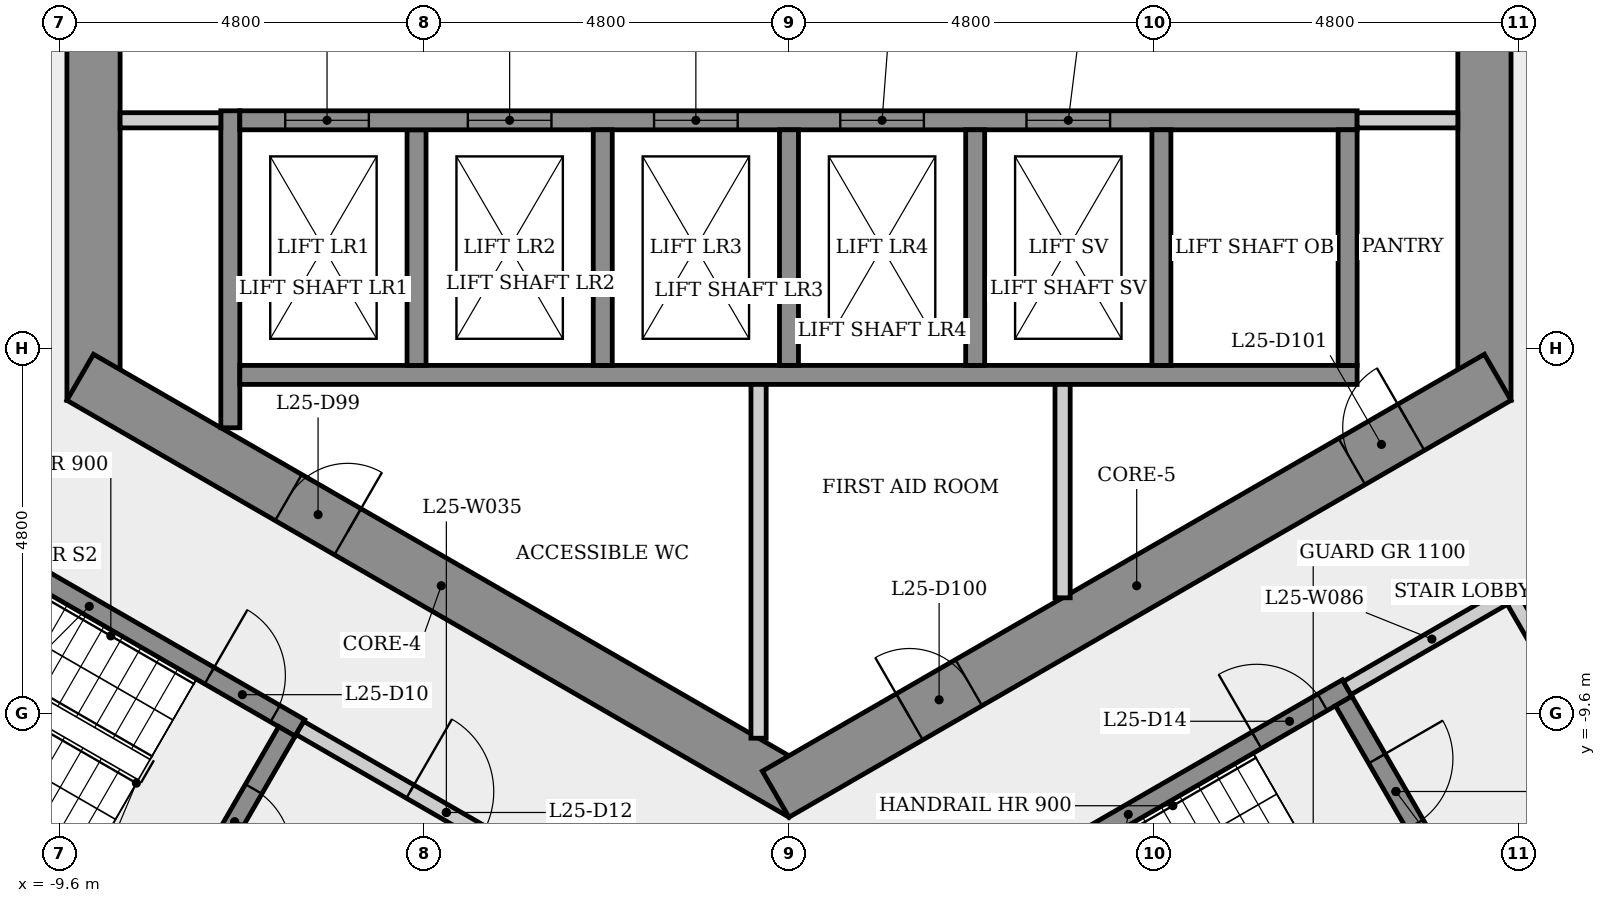
"""IFC4 building model, lengths in metres.
Left out: names, types, materials, properties, quantities, classifications, styles, units other than length and angle.
Written with IfcOpenShell. Run it as: python <this file> out.ifc"""

import sys

from ifc_helpers import new_model, si_unit, direction, frame, frame_2d, origin, place, context, subcontext, project, spatial, rectangle, extrude, element, fill, save


model = new_model("IFC4")
c1 = context("Model", 3, precision=1e-05, world=origin(), true_north=direction((0.0, 1.0)))
c2 = subcontext(c1, "Body", "Model", "MODEL_VIEW")
j1 = project(units=[si_unit("LENGTHUNIT", "METRE"), si_unit("PLANEANGLEUNIT", "RADIAN")], contexts=[c1])
p1 = place(None, origin())
s1 = spatial("IfcSite", under=j1, at=p1, CompositionType="ELEMENT")
p2 = place(p1, origin())
s2 = spatial("IfcBuilding", under=s1, at=p2, CompositionType="ELEMENT")
p3 = place(p2, frame((0.0, 0.0, 96.7)))
s3 = spatial("IfcBuildingStorey", under=s2, at=p3, CompositionType="ELEMENT", Elevation=96.7)
p4 = place(p3, frame((9.15, -5.485, 0.0), z_axis=(0.0, 0.0, 1.0), x_axis=(0.0, 1.0, 0.0)))
e1 = element("IfcWall", 1, at=p4, inside=s3, PredefinedType="SHEAR", context=c2, shape_type="SweptSolid", body=[
    extrude(rectangle(XDim=10.97, YDim=0.7, at=frame_2d((5.485, 0.0))), origin(), (0.0, 0.0, 1.0), 3.4),
])
p5 = place(p4, frame((4.685, 0.0, 0.0)))
e2 = element("IfcOpeningElement", 2, at=p5, cuts=e1, PredefinedType="OPENING", context=c2, shape_type="SweptSolid", body=[
    extrude(rectangle(XDim=1.6, YDim=2.1, at=frame_2d((0.8, 1.05))), frame((0.0, 0.36, 0.0), z_axis=(0.0, -1.0, 0.0), x_axis=(1.0, 0.0, 0.0)), (0.0, 0.0, 1.0), 0.72),
])
p6 = place(p3, frame((-9.15, 5.485, 0.0), z_axis=(0.0, 0.0, 1.0), x_axis=(0.0, -1.0, 0.0)))
e3 = element("IfcWall", 3, at=p6, inside=s3, PredefinedType="SHEAR", context=c2, shape_type="SweptSolid", body=[
    extrude(rectangle(XDim=10.97, YDim=0.7, at=frame_2d((5.485, 0.0))), origin(), (0.0, 0.0, 1.0), 3.4),
])
p7 = place(p6, frame((4.685, 0.0, 0.0)))
e4 = element("IfcOpeningElement", 4, at=p7, cuts=e3, PredefinedType="OPENING", context=c2, shape_type="SweptSolid", body=[
    extrude(rectangle(XDim=1.6, YDim=2.1, at=frame_2d((0.8, 1.05))), frame((0.0, 0.36, 0.0), z_axis=(0.0, -1.0, 0.0), x_axis=(1.0, 0.0, 0.0)), (0.0, 0.0, 1.0), 0.72),
])
p8 = place(p3, frame((-9.325, -5.182, 0.0), z_axis=(0.0, 0.0, 1.0), x_axis=(0.866023993627, -0.500002442456, 0.0)))
e5 = element("IfcWall", 5, at=p8, inside=s3, PredefinedType="SHEAR", context=c2, shape_type="SweptSolid", body=[
    extrude(rectangle(XDim=10.97, YDim=0.7, at=frame_2d((5.485, 0.0))), origin(), (0.0, 0.0, 1.0), 3.4),
])
p9 = place(p8, frame((3.164, 0.0, 0.0)))
e6 = element("IfcOpeningElement", 6, at=p9, cuts=e5, PredefinedType="OPENING", context=c2, shape_type="SweptSolid", body=[
    extrude(rectangle(XDim=0.9, YDim=2.1, at=frame_2d((0.45, 1.05))), frame((0.0, 0.36, 0.0), z_axis=(0.0, -1.0, 0.0), x_axis=(1.0, 0.0, 0.0)), (0.0, 0.0, 1.0), 0.72),
])
p10 = place(p3, frame((-0.175, -10.667, 0.0), z_axis=(0.0, 0.0, 1.0), x_axis=(0.866023993627, 0.500002442456, 0.0)))
e7 = element("IfcWall", 7, at=p10, inside=s3, PredefinedType="SHEAR", context=c2, shape_type="SweptSolid", body=[
    extrude(rectangle(XDim=10.97, YDim=0.7, at=frame_2d((5.485, 0.0))), origin(), (0.0, 0.0, 1.0), 3.4),
])
p11 = place(p10, frame((2.033, 0.0, 0.0)))
e8 = element("IfcOpeningElement", 8, at=p11, cuts=e7, PredefinedType="OPENING", context=c2, shape_type="SweptSolid", body=[
    extrude(rectangle(XDim=0.9, YDim=2.1, at=frame_2d((0.45, 1.05))), frame((0.0, 0.36, 0.0), z_axis=(0.0, -1.0, 0.0), x_axis=(1.0, 0.0, 0.0)), (0.0, 0.0, 1.0), 0.72),
])
p12 = place(p10, frame((8.754, 0.0, 0.0)))
e9 = element("IfcOpeningElement", 9, at=p12, cuts=e7, PredefinedType="OPENING", context=c2, shape_type="SweptSolid", body=[
    extrude(rectangle(XDim=0.9, YDim=2.1, at=frame_2d((0.45, 1.05))), frame((0.0, 0.36, 0.0), z_axis=(0.0, -1.0, 0.0), x_axis=(1.0, 0.0, 0.0)), (0.0, 0.0, 1.0), 0.72),
])
p13 = place(p3, frame((-11.977, -6.595, 0.0), z_axis=(0.0, 0.0, 1.0), x_axis=(0.866025499775, -0.499999833739, 0.0)))
e10 = element("IfcWall", 10, at=p13, inside=s3, PredefinedType="SHEAR", context=c2, shape_type="SweptSolid", body=[
    extrude(rectangle(XDim=6.4, YDim=0.25, at=frame_2d((3.2, 0.0))), origin(), (0.0, 0.0, 1.0), 3.05),
])
p14 = place(p13, frame((5.025, 0.0, 0.0)))
e11 = element("IfcOpeningElement", 11, at=p14, cuts=e10, PredefinedType="OPENING", context=c2, shape_type="SweptSolid", body=[
    extrude(rectangle(XDim=1.0, YDim=2.1, at=frame_2d((0.5, 1.05))), frame((0.0, 0.135, 0.0), z_axis=(0.0, -1.0, 0.0), x_axis=(1.0, 0.0, 0.0)), (0.0, 0.0, 1.0), 0.27),
])
p15 = place(p3, frame((-7.935, -12.393, 0.0), z_axis=(0.0, 0.0, 1.0), x_axis=(-0.866025499775, 0.499999833739, 0.0)))
e12 = element("IfcWall", 12, at=p15, inside=s3, PredefinedType="SHEAR", context=c2, shape_type="SweptSolid", body=[
    extrude(rectangle(XDim=6.4, YDim=0.25, at=frame_2d((3.2, 0.0))), origin(), (0.0, 0.0, 1.0), 3.05),
])
p16 = place(p3, frame((-7.35, -5.846, 0.0), z_axis=(0.0, 0.0, 1.0), x_axis=(0.0, 1.0, 0.0)))
e13 = element("IfcWall", 13, at=p16, inside=s3, PredefinedType="SHEAR", context=c2, shape_type="SweptSolid", body=[
    extrude(rectangle(XDim=4.171, YDim=0.25, at=frame_2d((2.085, 0.0))), origin(), (0.0, 0.0, 1.0), 3.05),
])
p17 = place(p3, frame((-7.475, -1.8, 0.0), z_axis=(0.0, 0.0, 1.0), x_axis=(-1.0, 0.0, 0.0)))
e14 = element("IfcWall", 14, at=p17, inside=s3, PredefinedType="PARTITIONING", context=c2, shape_type="SweptSolid", body=[
    extrude(rectangle(XDim=1.325, YDim=0.2, at=frame_2d((0.663, 0.0))), origin(), (0.0, 0.0, 1.0), 3.05),
])
p18 = place(p3, frame((-6.605, -9.841, 0.0), z_axis=(0.0, 0.0, 1.0), x_axis=(-0.499996545922, -0.866027397988, 0.0)))
e15 = element("IfcWall", 15, at=p18, inside=s3, PredefinedType="SHEAR", context=c2, shape_type="SweptSolid", body=[
    extrude(rectangle(XDim=2.75, YDim=0.25, at=frame_2d((1.375, 0.0))), origin(), (0.0, 0.0, 1.0), 3.05),
])
p19 = place(p18, frame((0.875, 0.0, 0.0)))
e16 = element("IfcOpeningElement", 16, at=p19, cuts=e15, PredefinedType="OPENING", context=c2, shape_type="SweptSolid", body=[
    extrude(rectangle(XDim=1.0, YDim=2.1, at=frame_2d((0.5, 1.05))), frame((0.0, 0.135, 0.0), z_axis=(0.0, -1.0, 0.0), x_axis=(1.0, 0.0, 0.0)), (0.0, 0.0, 1.0), 0.27),
])
p20 = place(p3, frame((-6.435, -9.795, 0.0), z_axis=(0.0, 0.0, 1.0), x_axis=(0.866012907634, -0.500021643343, 0.0)))
e17 = element("IfcWall", 17, at=p20, inside=s3, PredefinedType="PARTITIONING", context=c2, shape_type="SweptSolid", body=[
    extrude(rectangle(XDim=4.45, YDim=0.2, at=frame_2d((2.225, 0.0))), origin(), (0.0, 0.0, 1.0), 3.05),
])
p21 = place(p20, frame((1.675, 0.0, 0.0)))
e18 = element("IfcOpeningElement", 18, at=p21, cuts=e17, PredefinedType="OPENING", context=c2, shape_type="SweptSolid", body=[
    extrude(rectangle(XDim=1.1, YDim=2.1, at=frame_2d((0.55, 1.05))), frame((0.0, 0.11, 0.0), z_axis=(0.0, -1.0, 0.0), x_axis=(1.0, 0.0, 0.0)), (0.0, 0.0, 1.0), 0.22),
])
p22 = place(p3, frame((-7.225, -5.15, 0.0), z_axis=(0.0, 0.0, 1.0), x_axis=(1.0, 0.0, 0.0)))
e19 = element("IfcWall", 19, at=p22, inside=s3, PredefinedType="SHEAR", context=c2, shape_type="SweptSolid", body=[
    extrude(rectangle(XDim=14.7, YDim=0.25, at=frame_2d((7.35, 0.0))), origin(), (0.0, 0.0, 1.0), 3.05),
])
p23 = place(p3, frame((-4.9, -1.925, 0.0), z_axis=(0.0, 0.0, 1.0), x_axis=(0.0, -1.0, 0.0)))
e20 = element("IfcWall", 20, at=p23, inside=s3, PredefinedType="SHEAR", context=c2, shape_type="SweptSolid", body=[
    extrude(rectangle(XDim=3.1, YDim=0.25, at=frame_2d((1.55, 0.0))), origin(), (0.0, 0.0, 1.0), 3.4),
])
p24 = place(p3, frame((-7.225, -1.8, 0.0), z_axis=(0.0, 0.0, 1.0), x_axis=(1.0, 0.0, 0.0)))
e21 = element("IfcWall", 21, at=p24, inside=s3, PredefinedType="SHEAR", context=c2, shape_type="SweptSolid", body=[
    extrude(rectangle(XDim=14.7, YDim=0.25, at=frame_2d((7.35, 0.0))), origin(), (0.0, 0.0, 1.0), 3.05),
])
p25 = place(p24, frame((0.597, 0.0, 0.0)))
e22 = element("IfcOpeningElement", 22, at=p25, cuts=e21, PredefinedType="OPENING", context=c2, shape_type="SweptSolid", body=[
    extrude(rectangle(XDim=1.1, YDim=2.1, at=frame_2d((0.55, 1.05))), frame((0.0, 0.135, 0.0), z_axis=(0.0, -1.0, 0.0), x_axis=(1.0, 0.0, 0.0)), (0.0, 0.0, 1.0), 0.27),
])
p26 = place(p24, frame((3.0, 0.0, 0.0)))
e23 = element("IfcOpeningElement", 23, at=p26, cuts=e21, PredefinedType="OPENING", context=c2, shape_type="SweptSolid", body=[
    extrude(rectangle(XDim=1.1, YDim=2.1, at=frame_2d((0.55, 1.05))), frame((0.0, 0.135, 0.0), z_axis=(0.0, -1.0, 0.0), x_axis=(1.0, 0.0, 0.0)), (0.0, 0.0, 1.0), 0.27),
])
p27 = place(p24, frame((5.45, 0.0, 0.0)))
e24 = element("IfcOpeningElement", 24, at=p27, cuts=e21, PredefinedType="OPENING", context=c2, shape_type="SweptSolid", body=[
    extrude(rectangle(XDim=1.1, YDim=2.1, at=frame_2d((0.55, 1.05))), frame((0.0, 0.135, 0.0), z_axis=(0.0, -1.0, 0.0), x_axis=(1.0, 0.0, 0.0)), (0.0, 0.0, 1.0), 0.27),
])
p28 = place(p24, frame((7.9, 0.0, 0.0)))
e25 = element("IfcOpeningElement", 25, at=p28, cuts=e21, PredefinedType="OPENING", context=c2, shape_type="SweptSolid", body=[
    extrude(rectangle(XDim=1.1, YDim=2.1, at=frame_2d((0.55, 1.05))), frame((0.0, 0.135, 0.0), z_axis=(0.0, -1.0, 0.0), x_axis=(1.0, 0.0, 0.0)), (0.0, 0.0, 1.0), 0.27),
])
p29 = place(p24, frame((10.35, 0.0, 0.0)))
e26 = element("IfcOpeningElement", 26, at=p29, cuts=e21, PredefinedType="OPENING", context=c2, shape_type="SweptSolid", body=[
    extrude(rectangle(XDim=1.1, YDim=2.1, at=frame_2d((0.55, 1.05))), frame((0.0, 0.135, 0.0), z_axis=(0.0, -1.0, 0.0), x_axis=(1.0, 0.0, 0.0)), (0.0, 0.0, 1.0), 0.27),
])
p30 = place(p3, frame((-2.45, -1.925, 0.0), z_axis=(0.0, 0.0, 1.0), x_axis=(0.0, -1.0, 0.0)))
e27 = element("IfcWall", 27, at=p30, inside=s3, PredefinedType="SHEAR", context=c2, shape_type="SweptSolid", body=[
    extrude(rectangle(XDim=3.1, YDim=0.25, at=frame_2d((1.55, 0.0))), origin(), (0.0, 0.0, 1.0), 3.4),
])
p31 = place(p3, frame((-0.4, -5.275, 0.0), z_axis=(0.0, 0.0, 1.0), x_axis=(0.0, -1.0, 0.0)))
e28 = element("IfcWall", 28, at=p31, inside=s3, PredefinedType="PARTITIONING", context=c2, shape_type="SweptSolid", body=[
    extrude(rectangle(XDim=4.656, YDim=0.2, at=frame_2d((2.328, 0.0))), origin(), (0.0, 0.0, 1.0), 3.05),
])
p32 = place(p3, frame((0.0, -1.925, 0.0), z_axis=(0.0, 0.0, 1.0), x_axis=(0.0, -1.0, 0.0)))
e29 = element("IfcWall", 29, at=p32, inside=s3, PredefinedType="SHEAR", context=c2, shape_type="SweptSolid", body=[
    extrude(rectangle(XDim=3.1, YDim=0.25, at=frame_2d((1.55, 0.0))), origin(), (0.0, 0.0, 1.0), 3.4),
])
p33 = place(p3, frame((1.585, -12.595, 0.0), z_axis=(0.0, 0.0, 1.0), x_axis=(0.866036417653, 0.499980922934, 0.0)))
e30 = element("IfcWall", 30, at=p33, inside=s3, PredefinedType="SHEAR", context=c2, shape_type="SweptSolid", body=[
    extrude(rectangle(XDim=6.65, YDim=0.25, at=frame_2d((3.325, 0.0))), origin(), (0.0, 0.0, 1.0), 3.05),
])
p34 = place(p33, frame((5.275, 0.0, 0.0)))
e31 = element("IfcOpeningElement", 31, at=p34, cuts=e30, PredefinedType="OPENING", context=c2, shape_type="SweptSolid", body=[
    extrude(rectangle(XDim=1.0, YDim=2.1, at=frame_2d((0.5, 1.05))), frame((0.0, 0.135, 0.0), z_axis=(0.0, -1.0, 0.0), x_axis=(1.0, 0.0, 0.0)), (0.0, 0.0, 1.0), 0.27),
])
p35 = place(p3, frame((2.45, -1.925, 0.0), z_axis=(0.0, 0.0, 1.0), x_axis=(0.0, -1.0, 0.0)))
e32 = element("IfcWall", 32, at=p35, inside=s3, PredefinedType="SHEAR", context=c2, shape_type="SweptSolid", body=[
    extrude(rectangle(XDim=3.1, YDim=0.25, at=frame_2d((1.55, 0.0))), origin(), (0.0, 0.0, 1.0), 3.4),
])
p36 = place(p3, frame((3.6, -5.275, 0.0), z_axis=(0.0, 0.0, 1.0), x_axis=(0.0, -1.0, 0.0)))
e33 = element("IfcWall", 33, at=p36, inside=s3, PredefinedType="PARTITIONING", context=c2, shape_type="SweptSolid", body=[
    extrude(rectangle(XDim=2.808, YDim=0.2, at=frame_2d((1.404, 0.0))), origin(), (0.0, 0.0, 1.0), 3.05),
])
p37 = place(p3, frame((4.9, -1.925, 0.0), z_axis=(0.0, 0.0, 1.0), x_axis=(0.0, -1.0, 0.0)))
e34 = element("IfcWall", 34, at=p37, inside=s3, PredefinedType="SHEAR", context=c2, shape_type="SweptSolid", body=[
    extrude(rectangle(XDim=3.1, YDim=0.25, at=frame_2d((1.55, 0.0))), origin(), (0.0, 0.0, 1.0), 3.4),
])
p38 = place(p3, frame((7.298, -9.441, 0.0), z_axis=(0.0, 0.0, 1.0), x_axis=(0.500034990121, -0.866005201286, 0.0)))
e35 = element("IfcWall", 35, at=p38, inside=s3, PredefinedType="SHEAR", context=c2, shape_type="SweptSolid", body=[
    extrude(rectangle(XDim=2.75, YDim=0.25, at=frame_2d((1.375, 0.0))), origin(), (0.0, 0.0, 1.0), 3.05),
])
p39 = place(p38, frame((0.875, 0.0, 0.0)))
e36 = element("IfcOpeningElement", 36, at=p39, cuts=e35, PredefinedType="OPENING", context=c2, shape_type="SweptSolid", body=[
    extrude(rectangle(XDim=1.0, YDim=2.1, at=frame_2d((0.5, 1.05))), frame((0.0, 0.135, 0.0), z_axis=(0.0, -1.0, 0.0), x_axis=(1.0, 0.0, 0.0)), (0.0, 0.0, 1.0), 0.27),
])
p40 = place(p3, frame((7.344, -9.27, 0.0), z_axis=(0.0, 0.0, 1.0), x_axis=(0.866005588531, 0.500034319456, 0.0)))
e37 = element("IfcWall", 37, at=p40, inside=s3, PredefinedType="PARTITIONING", context=c2, shape_type="SweptSolid", body=[
    extrude(rectangle(XDim=2.575, YDim=0.2, at=frame_2d((1.288, 0.0))), origin(), (0.0, 0.0, 1.0), 3.05),
])
p41 = place(p3, frame((7.35, -1.925, 0.0), z_axis=(0.0, 0.0, 1.0), x_axis=(0.0, -1.0, 0.0)))
e38 = element("IfcWall", 38, at=p41, inside=s3, PredefinedType="SHEAR", context=c2, shape_type="SweptSolid", body=[
    extrude(rectangle(XDim=3.1, YDim=0.25, at=frame_2d((1.55, 0.0))), origin(), (0.0, 0.0, 1.0), 3.4),
])
p42 = place(p3, frame((8.8, -1.8, 0.0), z_axis=(0.0, 0.0, 1.0), x_axis=(-1.0, 0.0, 0.0)))
e39 = element("IfcWall", 39, at=p42, inside=s3, PredefinedType="PARTITIONING", context=c2, shape_type="SweptSolid", body=[
    extrude(rectangle(XDim=1.325, YDim=0.2, at=frame_2d((0.663, 0.0))), origin(), (0.0, 0.0, 1.0), 3.05),
])
p43 = place(p3, frame((9.537, -8.119, 0.0), z_axis=(0.0, 0.0, 1.0), x_axis=(0.499990139034, -0.866031096941, 0.0)))
e40 = element("IfcWall", 40, at=p43, inside=s3, PredefinedType="PARTITIONING", context=c2, shape_type="SweptSolid", body=[
    extrude(rectangle(XDim=3.0, YDim=0.2, at=frame_2d((1.5, 0.0))), origin(), (0.0, 0.0, 1.0), 3.05),
])
p44 = place(p43, frame((0.935, 0.0, 0.0)))
e41 = element("IfcOpeningElement", 41, at=p44, cuts=e40, PredefinedType="OPENING", context=c2, shape_type="SweptSolid", body=[
    extrude(rectangle(XDim=1.0, YDim=2.1, at=frame_2d((0.5, 1.05))), frame((0.0, 0.11, 0.0), z_axis=(0.0, -1.0, 0.0), x_axis=(1.0, 0.0, 0.0)), (0.0, 0.0, 1.0), 0.22),
])
p45 = place(p3, frame((10.901, -10.681, 0.0), z_axis=(0.0, 0.0, 1.0), x_axis=(-0.866007538022, -0.500030943131, 0.0)))
e42 = element("IfcWall", 42, at=p45, inside=s3, PredefinedType="PARTITIONING", context=c2, shape_type="SweptSolid", body=[
    extrude(rectangle(XDim=2.375, YDim=0.2, at=frame_2d((1.188, 0.0))), origin(), (0.0, 0.0, 1.0), 3.05),
])
p46 = place(p25, origin())
e43 = element("IfcDoor", 43, at=p46, inside=s3, OperationType="SLIDING_TO_LEFT", PredefinedType="DOOR", context=c2, shape_type="SweptSolid", body=[
    extrude(rectangle(XDim=1.1, YDim=2.1, at=frame_2d((0.55, 1.05))), frame((0.0, 0.025, 0.0), z_axis=(0.0, -1.0, 0.0), x_axis=(1.0, 0.0, 0.0)), (0.0, 0.0, 1.0), 0.05),
])
fill(e22, e43)
p47 = place(p26, origin())
e44 = element("IfcDoor", 44, at=p47, inside=s3, OperationType="SLIDING_TO_LEFT", PredefinedType="DOOR", context=c2, shape_type="SweptSolid", body=[
    extrude(rectangle(XDim=1.1, YDim=2.1, at=frame_2d((0.55, 1.05))), frame((0.0, 0.025, 0.0), z_axis=(0.0, -1.0, 0.0), x_axis=(1.0, 0.0, 0.0)), (0.0, 0.0, 1.0), 0.05),
])
fill(e23, e44)
p48 = place(p27, origin())
e45 = element("IfcDoor", 45, at=p48, inside=s3, OperationType="SLIDING_TO_LEFT", PredefinedType="DOOR", context=c2, shape_type="SweptSolid", body=[
    extrude(rectangle(XDim=1.1, YDim=2.1, at=frame_2d((0.55, 1.05))), frame((0.0, 0.025, 0.0), z_axis=(0.0, -1.0, 0.0), x_axis=(1.0, 0.0, 0.0)), (0.0, 0.0, 1.0), 0.05),
])
fill(e24, e45)
p49 = place(p28, origin())
e46 = element("IfcDoor", 46, at=p49, inside=s3, OperationType="SLIDING_TO_LEFT", PredefinedType="DOOR", context=c2, shape_type="SweptSolid", body=[
    extrude(rectangle(XDim=1.1, YDim=2.1, at=frame_2d((0.55, 1.05))), frame((0.0, 0.025, 0.0), z_axis=(0.0, -1.0, 0.0), x_axis=(1.0, 0.0, 0.0)), (0.0, 0.0, 1.0), 0.05),
])
fill(e25, e46)
p50 = place(p29, origin())
e47 = element("IfcDoor", 47, at=p50, inside=s3, OperationType="SLIDING_TO_LEFT", PredefinedType="DOOR", context=c2, shape_type="SweptSolid", body=[
    extrude(rectangle(XDim=1.1, YDim=2.1, at=frame_2d((0.55, 1.05))), frame((0.0, 0.025, 0.0), z_axis=(0.0, -1.0, 0.0), x_axis=(1.0, 0.0, 0.0)), (0.0, 0.0, 1.0), 0.05),
])
fill(e26, e47)
p51 = place(p14, origin())
e48 = element("IfcDoor", 48, at=p51, inside=s3, OperationType="SINGLE_SWING_LEFT", PredefinedType="DOOR", context=c2, shape_type="SweptSolid", body=[
    extrude(rectangle(XDim=1.0, YDim=2.1, at=frame_2d((0.5, 1.05))), frame((0.0, 0.025, 0.0), z_axis=(0.0, -1.0, 0.0), x_axis=(1.0, 0.0, 0.0)), (0.0, 0.0, 1.0), 0.05),
])
fill(e11, e48)
p52 = place(p19, origin())
e49 = element("IfcDoor", 49, at=p52, inside=s3, OperationType="SINGLE_SWING_RIGHT", PredefinedType="DOOR", context=c2, shape_type="SweptSolid", body=[
    extrude(rectangle(XDim=1.0, YDim=2.1, at=frame_2d((0.5, 1.05))), frame((0.0, 0.025, 0.0), z_axis=(0.0, -1.0, 0.0), x_axis=(1.0, 0.0, 0.0)), (0.0, 0.0, 1.0), 0.05),
])
fill(e16, e49)
p53 = place(p21, origin())
e50 = element("IfcDoor", 50, at=p53, inside=s3, OperationType="SINGLE_SWING_LEFT", PredefinedType="DOOR", context=c2, shape_type="SweptSolid", body=[
    extrude(rectangle(XDim=1.1, YDim=2.1, at=frame_2d((0.55, 1.05))), frame((0.0, 0.025, 0.0), z_axis=(0.0, -1.0, 0.0), x_axis=(1.0, 0.0, 0.0)), (0.0, 0.0, 1.0), 0.05),
])
fill(e18, e50)
p54 = place(p34, origin())
e51 = element("IfcDoor", 51, at=p54, inside=s3, OperationType="SINGLE_SWING_LEFT", PredefinedType="DOOR", context=c2, shape_type="SweptSolid", body=[
    extrude(rectangle(XDim=1.0, YDim=2.1, at=frame_2d((0.5, 1.05))), frame((0.0, 0.025, 0.0), z_axis=(0.0, -1.0, 0.0), x_axis=(1.0, 0.0, 0.0)), (0.0, 0.0, 1.0), 0.05),
])
fill(e31, e51)
p55 = place(p39, origin())
e52 = element("IfcDoor", 52, at=p55, inside=s3, OperationType="SINGLE_SWING_LEFT", PredefinedType="DOOR", context=c2, shape_type="SweptSolid", body=[
    extrude(rectangle(XDim=1.0, YDim=2.1, at=frame_2d((0.5, 1.05))), frame((0.0, 0.025, 0.0), z_axis=(0.0, -1.0, 0.0), x_axis=(1.0, 0.0, 0.0)), (0.0, 0.0, 1.0), 0.05),
])
fill(e36, e52)
p56 = place(p9, origin())
e53 = element("IfcDoor", 53, at=p56, inside=s3, OperationType="SINGLE_SWING_RIGHT", PredefinedType="DOOR", context=c2, shape_type="SweptSolid", body=[
    extrude(rectangle(XDim=0.9, YDim=2.1, at=frame_2d((0.45, 1.05))), frame((0.0, 0.025, 0.0), z_axis=(0.0, -1.0, 0.0), x_axis=(1.0, 0.0, 0.0)), (0.0, 0.0, 1.0), 0.05),
])
fill(e6, e53)
p57 = place(p11, origin())
e54 = element("IfcDoor", 54, at=p57, inside=s3, OperationType="SINGLE_SWING_LEFT", PredefinedType="DOOR", context=c2, shape_type="SweptSolid", body=[
    extrude(rectangle(XDim=0.9, YDim=2.1, at=frame_2d((0.45, 1.05))), frame((0.0, 0.025, 0.0), z_axis=(0.0, -1.0, 0.0), x_axis=(1.0, 0.0, 0.0)), (0.0, 0.0, 1.0), 0.05),
])
fill(e8, e54)
p58 = place(p12, origin())
e55 = element("IfcDoor", 55, at=p58, inside=s3, OperationType="SINGLE_SWING_RIGHT", PredefinedType="DOOR", context=c2, shape_type="SweptSolid", body=[
    extrude(rectangle(XDim=0.9, YDim=2.1, at=frame_2d((0.45, 1.05))), frame((0.0, 0.025, 0.0), z_axis=(0.0, -1.0, 0.0), x_axis=(1.0, 0.0, 0.0)), (0.0, 0.0, 1.0), 0.05),
])
fill(e9, e55)
save(model, sys.argv[1])
